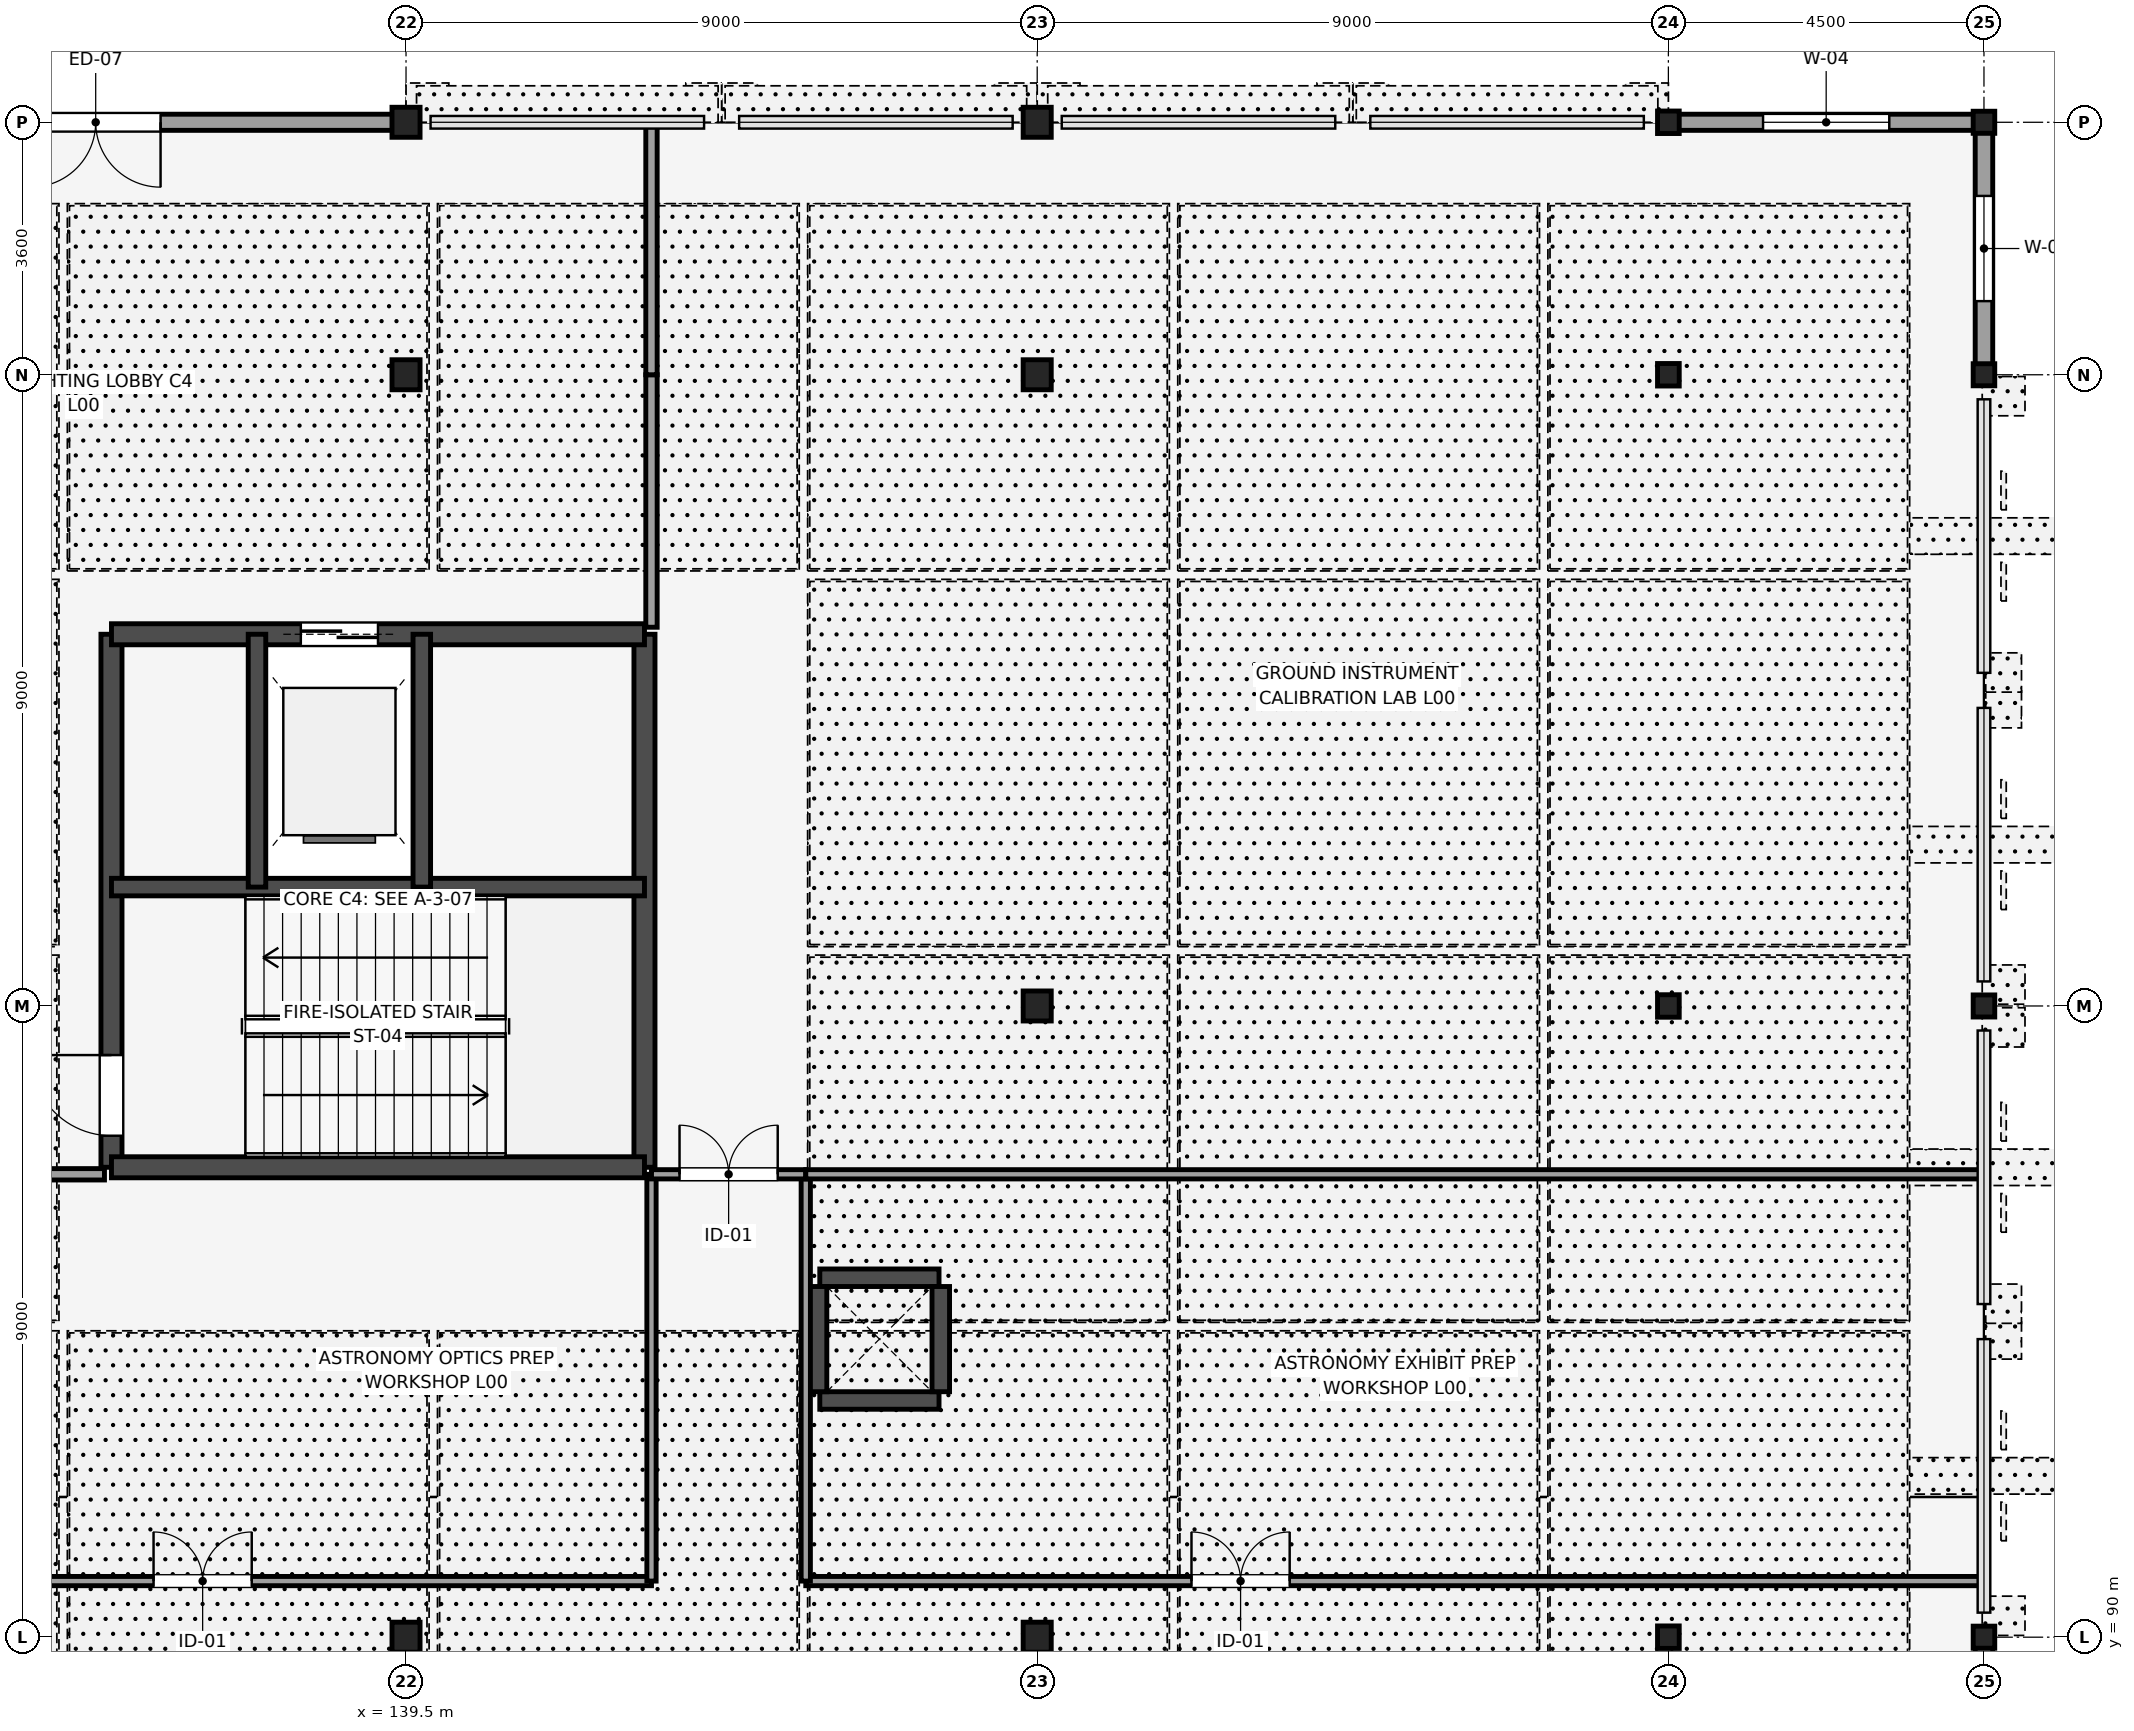
"""IFC4 building model, lengths in metres.
Left out: names, types, materials, properties, quantities, classifications, styles, units other than length and angle.
Written with IfcOpenShell. Run it as: python <this file> out.ifc"""

import sys

from ifc_helpers import new_model, si_unit, direction, frame, frame_2d, origin, origin_2d, place, context, subcontext, project, spatial, rectangle, i_section, extrude, element, fill, save


model = new_model("IFC4")
c1 = context("Model", 3, precision=1e-05, world=origin(), true_north=direction((0.0, 1.0)))
c2 = subcontext(c1, "Body", "Model", "MODEL_VIEW")
j1 = project(units=[si_unit("LENGTHUNIT", "METRE"), si_unit("PLANEANGLEUNIT", "RADIAN")], contexts=[c1])
p1 = place(None, origin())
s1 = spatial("IfcSite", under=j1, at=p1, CompositionType="ELEMENT")
p2 = place(p1, origin())
s2 = spatial("IfcBuilding", under=s1, at=p2, CompositionType="ELEMENT")
p3 = place(p2, origin())
s3 = spatial("IfcBuildingStorey", under=s2, at=p3, CompositionType="ELEMENT", Elevation=0.0)
for number, where, z_axis, x_axis in (
    (1, (139.5, 90.0, 0.0), (0.0, 0.0, 1.0), (1.0, 0.0, 0.0)),
    (2, (139.5, 108.0, 0.0), (0.0, 0.0, 1.0), (1.0, 0.0, 0.0)),
    (3, (139.5, 111.6, 0.0), (0.0, 0.0, 1.0), (1.0, 0.0, 0.0)),
    (4, (148.5, 90.0, 0.0), (0.0, 0.0, 1.0), (1.0, 0.0, 0.0)),
    (5, (148.5, 99.0, 0.0), (0.0, 0.0, 1.0), (1.0, 0.0, 0.0)),
    (6, (148.5, 108.0, 0.0), (0.0, 0.0, 1.0), (1.0, 0.0, 0.0)),
    (7, (148.5, 111.6, 0.0), (0.0, 0.0, 1.0), (1.0, 0.0, 0.0)),
):
    element("IfcColumn", number, at=place(p3, frame(where, z_axis=z_axis, x_axis=x_axis)), inside=s3, PredefinedType="COLUMN", context=c2, shape_type="SweptSolid", body=[
        extrude(i_section(OverallWidth=0.4, OverallDepth=0.428, WebThickness=0.02, FlangeThickness=0.028, FilletRadius=0.016, at=origin_2d()), origin(), (0.0, 0.0, 1.0), 5.4),
    ])
for number, where, z_axis, x_axis in (
    (8, (157.5, 90.0, 0.0), (0.0, 0.0, 1.0), (1.0, 0.0, 0.0)),
    (9, (157.5, 99.0, 0.0), (0.0, 0.0, 1.0), (1.0, 0.0, 0.0)),
    (10, (157.5, 108.0, 0.0), (0.0, 0.0, 1.0), (1.0, 0.0, 0.0)),
    (11, (157.5, 111.6, 0.0), (0.0, 0.0, 1.0), (1.0, 0.0, 0.0)),
):
    element("IfcColumn", number, at=place(p3, frame(where, z_axis=z_axis, x_axis=x_axis)), inside=s3, PredefinedType="COLUMN", context=c2, shape_type="SweptSolid", body=[
        extrude(i_section(OverallWidth=0.309, OverallDepth=0.321, WebThickness=0.014, FlangeThickness=0.022, FilletRadius=0.017, at=origin_2d()), origin(), (0.0, 0.0, 1.0), 5.4),
    ])
for number, where, z_axis, x_axis in (
    (12, (162.0, 90.0, 0.0), (0.0, 0.0, 1.0), (1.0, 0.0, 0.0)),
    (13, (162.0, 99.0, 0.0), (0.0, 0.0, 1.0), (1.0, 0.0, 0.0)),
    (14, (162.0, 108.0, 0.0), (0.0, 0.0, 1.0), (1.0, 0.0, 0.0)),
    (15, (162.0, 111.6, 0.0), (0.0, 0.0, 1.0), (1.0, 0.0, 0.0)),
):
    element("IfcColumn", number, at=place(p3, frame(where, z_axis=z_axis, x_axis=x_axis)), inside=s3, PredefinedType="COLUMN", context=c2, shape_type="SweptSolid", body=[
        extrude(i_section(OverallWidth=0.307, OverallDepth=0.315, WebThickness=0.012, FlangeThickness=0.019, FilletRadius=0.017, at=origin_2d()), origin(), (0.0, 0.0, 1.0), 5.4),
    ])
p4 = place(p3, frame((135.3, 96.7, 0.0), z_axis=(0.0, 0.0, 1.0), x_axis=(0.0, 1.0, 0.0)))
e16 = element("IfcWall", 16, at=p4, inside=s3, PredefinedType="SHEAR", context=c2, shape_type="SweptSolid", body=[
    extrude(rectangle(XDim=7.6, YDim=0.3, at=frame_2d((3.8, 0.0))), origin(), (0.0, 0.0, 1.0), 5.4),
])
p5 = place(p4, frame((0.45, 0.0, 0.0)))
e17 = element("IfcOpeningElement", 17, at=p5, cuts=e16, PredefinedType="OPENING", context=c2, shape_type="SweptSolid", body=[
    extrude(rectangle(XDim=1.15, YDim=2.15, at=frame_2d((0.575, 1.075))), frame((0.0, 0.16, 0.0), z_axis=(0.0, -1.0, 0.0), x_axis=(1.0, 0.0, 0.0)), (0.0, 0.0, 1.0), 0.32),
])
p6 = place(p3, frame((142.9, 96.7, 0.0), z_axis=(0.0, 0.0, 1.0), x_axis=(0.0, 1.0, 0.0)))
e18 = element("IfcWall", 18, at=p6, inside=s3, PredefinedType="SHEAR", context=c2, shape_type="SweptSolid", body=[
    extrude(rectangle(XDim=7.6, YDim=0.3, at=frame_2d((3.8, 0.0))), origin(), (0.0, 0.0, 1.0), 5.4),
])
p7 = place(p3, frame((135.3, 96.7, 0.0), z_axis=(0.0, 0.0, 1.0), x_axis=(1.0, 0.0, 0.0)))
e19 = element("IfcWall", 19, at=p7, inside=s3, PredefinedType="SHEAR", context=c2, shape_type="SweptSolid", body=[
    extrude(rectangle(XDim=7.6, YDim=0.3, at=frame_2d((3.8, 0.0))), origin(), (0.0, 0.0, 1.0), 5.4),
])
p8 = place(p3, frame((135.3, 104.3, 0.0), z_axis=(0.0, 0.0, 1.0), x_axis=(1.0, 0.0, 0.0)))
e20 = element("IfcWall", 20, at=p8, inside=s3, PredefinedType="SHEAR", context=c2, shape_type="SweptSolid", body=[
    extrude(rectangle(XDim=7.6, YDim=0.3, at=frame_2d((3.8, 0.0))), origin(), (0.0, 0.0, 1.0), 5.4),
])
p9 = place(p8, frame((2.7, 0.0, 0.0)))
e21 = element("IfcOpeningElement", 21, at=p9, cuts=e20, PredefinedType="OPENING", context=c2, shape_type="SweptSolid", body=[
    extrude(rectangle(XDim=1.1, YDim=2.2, at=frame_2d((0.55, 1.1))), frame((0.0, 0.16, 0.0), z_axis=(0.0, -1.0, 0.0), x_axis=(1.0, 0.0, 0.0)), (0.0, 0.0, 1.0), 0.32),
])
p10 = place(p3, frame((135.3, 100.695, 0.0), z_axis=(0.0, 0.0, 1.0), x_axis=(1.0, 0.0, 0.0)))
e22 = element("IfcWall", 22, at=p10, inside=s3, PredefinedType="SHEAR", context=c2, shape_type="SweptSolid", body=[
    extrude(rectangle(XDim=7.6, YDim=0.25, at=frame_2d((3.8, 0.0))), origin(), (0.0, 0.0, 1.0), 5.4),
])
for number, where, z_axis, x_axis in (
    (23, (137.375, 100.695, 0.0), (0.0, 0.0, 1.0), (0.0, 1.0, 0.0)),
    (24, (139.725, 100.695, 0.0), (0.0, 0.0, 1.0), (0.0, 1.0, 0.0)),
):
    element("IfcWall", number, at=place(p3, frame(where, z_axis=z_axis, x_axis=x_axis)), inside=s3, PredefinedType="SHEAR", context=c2, shape_type="SweptSolid", body=[
        extrude(rectangle(XDim=3.605, YDim=0.25, at=frame_2d((1.802, 0.0))), origin(), (0.0, 0.0, 1.0), 5.4),
    ])
for number, where, z_axis, x_axis in (
    (25, (145.4, 93.375, 0.0), (0.0, 0.0, 1.0), (1.0, 0.0, 0.0)),
    (26, (145.4, 95.125, 0.0), (0.0, 0.0, 1.0), (1.0, 0.0, 0.0)),
):
    element("IfcWall", number, at=place(p3, frame(where, z_axis=z_axis, x_axis=x_axis)), inside=s3, PredefinedType="SHEAR", context=c2, shape_type="SweptSolid", body=[
        extrude(rectangle(XDim=1.7, YDim=0.25, at=frame_2d((0.85, 0.0))), origin(), (0.0, 0.0, 1.0), 4.67),
    ])
for number, where, z_axis, x_axis in (
    (27, (145.375, 93.5, 0.0), (0.0, 0.0, 1.0), (0.0, 1.0, 0.0)),
    (28, (147.125, 93.5, 0.0), (0.0, 0.0, 1.0), (0.0, 1.0, 0.0)),
):
    element("IfcWall", number, at=place(p3, frame(where, z_axis=z_axis, x_axis=x_axis)), inside=s3, PredefinedType="SHEAR", context=c2, shape_type="SweptSolid", body=[
        extrude(rectangle(XDim=1.5, YDim=0.25, at=frame_2d((0.75, 0.0))), origin(), (0.0, 0.0, 1.0), 4.67),
    ])
p11 = place(p3, frame((139.5, 111.6, 0.0), z_axis=(0.0, 0.0, 1.0), x_axis=(-1.0, 0.0, 0.0)))
e29 = element("IfcWall", 29, at=p11, inside=s3, PredefinedType="STANDARD", context=c2, shape_type="SweptSolid", body=[
    extrude(rectangle(XDim=9.0, YDim=0.23, at=frame_2d((4.5, 0.0))), origin(), (0.0, 0.0, 1.0), 5.22),
])
p12 = place(p11, frame((3.5, 0.0, 0.0)))
e30 = element("IfcOpeningElement", 30, at=p12, cuts=e29, PredefinedType="OPENING", context=c2, shape_type="SweptSolid", body=[
    extrude(rectangle(XDim=1.85, YDim=2.2, at=frame_2d((0.925, 1.1))), frame((0.0, 0.125, 0.0), z_axis=(0.0, -1.0, 0.0), x_axis=(1.0, 0.0, 0.0)), (0.0, 0.0, 1.0), 0.25),
])
p13 = place(p3, frame((162.0, 111.6, 0.0), z_axis=(0.0, 0.0, 1.0), x_axis=(-1.0, 0.0, 0.0)))
e31 = element("IfcWall", 31, at=p13, inside=s3, PredefinedType="STANDARD", context=c2, shape_type="SweptSolid", body=[
    extrude(rectangle(XDim=4.5, YDim=0.23, at=frame_2d((2.25, 0.0))), origin(), (0.0, 0.0, 1.0), 5.22),
])
p14 = place(p13, frame((1.35, 0.0, 0.9)))
e32 = element("IfcOpeningElement", 32, at=p14, cuts=e31, PredefinedType="OPENING", context=c2, shape_type="SweptSolid", body=[
    extrude(rectangle(XDim=1.8, YDim=2.1, at=frame_2d((0.9, 1.05))), frame((0.0, 0.125, 0.0), z_axis=(0.0, -1.0, 0.0), x_axis=(1.0, 0.0, 0.0)), (0.0, 0.0, 1.0), 0.25),
])
p15 = place(p3, frame((162.0, 81.0, 0.0), z_axis=(0.0, 0.0, 1.0), x_axis=(0.0, 1.0, 0.0)))
e33 = element("IfcWall", 33, at=p15, inside=s3, PredefinedType="STANDARD", context=c2, shape_type="SweptSolid", body=[
    extrude(rectangle(XDim=9.0, YDim=0.25, at=frame_2d((4.5, 0.0))), origin(), (0.0, 0.0, 1.0), 4.746),
])
p16 = place(p3, frame((162.0, 108.0, 0.0), z_axis=(0.0, 0.0, 1.0), x_axis=(0.0, 1.0, 0.0)))
e34 = element("IfcWall", 34, at=p16, inside=s3, PredefinedType="STANDARD", context=c2, shape_type="SweptSolid", body=[
    extrude(rectangle(XDim=3.6, YDim=0.25, at=frame_2d((1.8, 0.0))), origin(), (0.0, 0.0, 1.0), 4.746),
])
p17 = place(p16, frame((1.05, 0.0, 1.0)))
e35 = element("IfcOpeningElement", 35, at=p17, cuts=e34, PredefinedType="OPENING", context=c2, shape_type="SweptSolid", body=[
    extrude(rectangle(XDim=1.5, YDim=1.5, at=frame_2d((0.75, 0.75))), frame((0.0, 0.135, 0.0), z_axis=(0.0, -1.0, 0.0), x_axis=(1.0, 0.0, 0.0)), (0.0, 0.0, 1.0), 0.27),
])
p18 = place(p3, frame((131.4, 96.6, 0.0), z_axis=(0.0, 0.0, 1.0), x_axis=(1.0, 0.0, 0.0)))
e36 = element("IfcWall", 36, at=p18, inside=s3, PredefinedType="PARTITIONING", context=c2, shape_type="SweptSolid", body=[
    extrude(rectangle(XDim=3.8, YDim=0.162, at=frame_2d((1.9, 0.0))), origin(), (0.0, 0.0, 1.0), 5.22),
])
p19 = place(p3, frame((143.0, 104.4, 0.0), z_axis=(0.0, 0.0, 1.0), x_axis=(0.0, 1.0, 0.0)))
e37 = element("IfcWall", 37, at=p19, inside=s3, PredefinedType="PARTITIONING", context=c2, shape_type="SweptSolid", body=[
    extrude(rectangle(XDim=3.6, YDim=0.162, at=frame_2d((1.8, 0.0))), origin(), (0.0, 0.0, 1.0), 5.22),
])
p20 = place(p3, frame((131.4, 90.8, 0.0), z_axis=(0.0, 0.0, 1.0), x_axis=(1.0, 0.0, 0.0)))
e38 = element("IfcWall", 38, at=p20, inside=s3, PredefinedType="PARTITIONING", context=c2, shape_type="SweptSolid", body=[
    extrude(rectangle(XDim=11.6, YDim=0.132, at=frame_2d((5.8, 0.0))), origin(), (0.0, 0.0, 1.0), 5.22),
])
p21 = place(p20, frame((4.5, 0.0, 0.0)))
e39 = element("IfcOpeningElement", 39, at=p21, cuts=e38, PredefinedType="OPENING", context=c2, shape_type="SweptSolid", body=[
    extrude(rectangle(XDim=1.4, YDim=2.2, at=frame_2d((0.7, 1.1))), frame((0.0, 0.076, 0.0), z_axis=(0.0, -1.0, 0.0), x_axis=(1.0, 0.0, 0.0)), (0.0, 0.0, 1.0), 0.152),
])
p22 = place(p3, frame((145.2, 90.8, 0.0), z_axis=(0.0, 0.0, 1.0), x_axis=(1.0, 0.0, 0.0)))
e40 = element("IfcWall", 40, at=p22, inside=s3, PredefinedType="PARTITIONING", context=c2, shape_type="SweptSolid", body=[
    extrude(rectangle(XDim=16.8, YDim=0.132, at=frame_2d((8.4, 0.0))), origin(), (0.0, 0.0, 1.0), 5.22),
])
p23 = place(p22, frame((5.5, 0.0, 0.0)))
e41 = element("IfcOpeningElement", 41, at=p23, cuts=e40, PredefinedType="OPENING", context=c2, shape_type="SweptSolid", body=[
    extrude(rectangle(XDim=1.4, YDim=2.2, at=frame_2d((0.7, 1.1))), frame((0.0, 0.076, 0.0), z_axis=(0.0, -1.0, 0.0), x_axis=(1.0, 0.0, 0.0)), (0.0, 0.0, 1.0), 0.152),
])
for number, where, z_axis, x_axis in (
    (42, (143.0, 90.8, 0.0), (0.0, 0.0, 1.0), (0.0, 1.0, 0.0)),
    (43, (145.2, 90.8, 0.0), (0.0, 0.0, 1.0), (0.0, 1.0, 0.0)),
):
    element("IfcWall", number, at=place(p3, frame(where, z_axis=z_axis, x_axis=x_axis)), inside=s3, PredefinedType="PARTITIONING", context=c2, shape_type="SweptSolid", body=[
        extrude(rectangle(XDim=5.8, YDim=0.132, at=frame_2d((2.9, 0.0))), origin(), (0.0, 0.0, 1.0), 5.22),
    ])
p24 = place(p3, frame((143.0, 96.6, 0.0), z_axis=(0.0, 0.0, 1.0), x_axis=(1.0, 0.0, 0.0)))
e44 = element("IfcWall", 44, at=p24, inside=s3, PredefinedType="PARTITIONING", context=c2, shape_type="SweptSolid", body=[
    extrude(rectangle(XDim=2.2, YDim=0.132, at=frame_2d((1.1, 0.0))), origin(), (0.0, 0.0, 1.0), 5.22),
])
p25 = place(p24, frame((0.4, 0.0, 0.0)))
e45 = element("IfcOpeningElement", 45, at=p25, cuts=e44, PredefinedType="OPENING", context=c2, shape_type="SweptSolid", body=[
    extrude(rectangle(XDim=1.4, YDim=2.2, at=frame_2d((0.7, 1.1))), frame((0.0, 0.076, 0.0), z_axis=(0.0, -1.0, 0.0), x_axis=(1.0, 0.0, 0.0)), (0.0, 0.0, 1.0), 0.152),
])
p26 = place(p3, frame((145.2, 96.6, 0.0), z_axis=(0.0, 0.0, 1.0), x_axis=(1.0, 0.0, 0.0)))
e46 = element("IfcWall", 46, at=p26, inside=s3, PredefinedType="PARTITIONING", context=c2, shape_type="SweptSolid", body=[
    extrude(rectangle(XDim=16.8, YDim=0.132, at=frame_2d((8.4, 0.0))), origin(), (0.0, 0.0, 1.0), 5.22),
])
p27 = place(p3, frame((143.0, 108.0, 0.0), z_axis=(0.0, 0.0, 1.0), x_axis=(0.0, 1.0, 0.0)))
e47 = element("IfcWall", 47, at=p27, inside=s3, PredefinedType="PARTITIONING", context=c2, shape_type="SweptSolid", body=[
    extrude(rectangle(XDim=3.6, YDim=0.162, at=frame_2d((1.8, 0.0))), origin(), (0.0, 0.0, 1.0), 5.22),
])
p28 = place(p12, origin())
e48 = element("IfcDoor", 48, at=p28, inside=s3, OperationType="DOUBLE_DOOR_SINGLE_SWING", PredefinedType="DOOR", context=c2, shape_type="SweptSolid", body=[
    extrude(rectangle(XDim=1.85, YDim=2.2, at=frame_2d((0.925, 1.1))), frame((0.0, 0.025, 0.0), z_axis=(0.0, -1.0, 0.0), x_axis=(1.0, 0.0, 0.0)), (0.0, 0.0, 1.0), 0.05),
])
fill(e30, e48)
p29 = place(p14, origin())
e49 = element("IfcWindow", 49, at=p29, inside=s3, PartitioningType="SINGLE_PANEL", PredefinedType="WINDOW", context=c2, shape_type="SweptSolid", body=[
    extrude(rectangle(XDim=1.8, YDim=2.1, at=frame_2d((0.9, 1.05))), frame((0.0, 0.03, 0.0), z_axis=(0.0, -1.0, 0.0), x_axis=(1.0, 0.0, 0.0)), (0.0, 0.0, 1.0), 0.06),
])
fill(e32, e49)
p30 = place(p17, origin())
e50 = element("IfcWindow", 50, at=p30, inside=s3, PartitioningType="SINGLE_PANEL", PredefinedType="WINDOW", context=c2, shape_type="SweptSolid", body=[
    extrude(rectangle(XDim=1.5, YDim=1.5, at=frame_2d((0.75, 0.75))), frame((0.0, 0.03, 0.0), z_axis=(0.0, -1.0, 0.0), x_axis=(1.0, 0.0, 0.0)), (0.0, 0.0, 1.0), 0.06),
])
fill(e35, e50)
p31 = place(p5, origin())
e51 = element("IfcDoor", 51, at=p31, inside=s3, OperationType="SINGLE_SWING_RIGHT", PredefinedType="DOOR", context=c2, shape_type="SweptSolid", body=[
    extrude(rectangle(XDim=1.15, YDim=2.15, at=frame_2d((0.575, 1.075))), frame((0.0, 0.025, 0.0), z_axis=(0.0, -1.0, 0.0), x_axis=(1.0, 0.0, 0.0)), (0.0, 0.0, 1.0), 0.05),
])
fill(e17, e51)
p32 = place(p9, origin())
e52 = element("IfcDoor", 52, at=p32, inside=s3, OperationType="DOUBLE_DOOR_SLIDING", PredefinedType="DOOR", context=c2, shape_type="SweptSolid", body=[
    extrude(rectangle(XDim=1.1, YDim=2.2, at=frame_2d((0.55, 1.1))), frame((0.0, 0.025, 0.0), z_axis=(0.0, -1.0, 0.0), x_axis=(1.0, 0.0, 0.0)), (0.0, 0.0, 1.0), 0.05),
])
fill(e21, e52)
p33 = place(p21, origin())
e53 = element("IfcDoor", 53, at=p33, inside=s3, OperationType="DOUBLE_DOOR_SINGLE_SWING", PredefinedType="DOOR", context=c2, shape_type="SweptSolid", body=[
    extrude(rectangle(XDim=1.4, YDim=2.2, at=frame_2d((0.7, 1.1))), frame((0.0, 0.025, 0.0), z_axis=(0.0, -1.0, 0.0), x_axis=(1.0, 0.0, 0.0)), (0.0, 0.0, 1.0), 0.05),
])
fill(e39, e53)
p34 = place(p23, origin())
e54 = element("IfcDoor", 54, at=p34, inside=s3, OperationType="DOUBLE_DOOR_SINGLE_SWING", PredefinedType="DOOR", context=c2, shape_type="SweptSolid", body=[
    extrude(rectangle(XDim=1.4, YDim=2.2, at=frame_2d((0.7, 1.1))), frame((0.0, 0.025, 0.0), z_axis=(0.0, -1.0, 0.0), x_axis=(1.0, 0.0, 0.0)), (0.0, 0.0, 1.0), 0.05),
])
fill(e41, e54)
p35 = place(p25, origin())
e55 = element("IfcDoor", 55, at=p35, inside=s3, OperationType="DOUBLE_DOOR_SINGLE_SWING", PredefinedType="DOOR", context=c2, shape_type="SweptSolid", body=[
    extrude(rectangle(XDim=1.4, YDim=2.2, at=frame_2d((0.7, 1.1))), frame((0.0, 0.025, 0.0), z_axis=(0.0, -1.0, 0.0), x_axis=(1.0, 0.0, 0.0)), (0.0, 0.0, 1.0), 0.05),
])
fill(e45, e55)
save(model, sys.argv[1])
